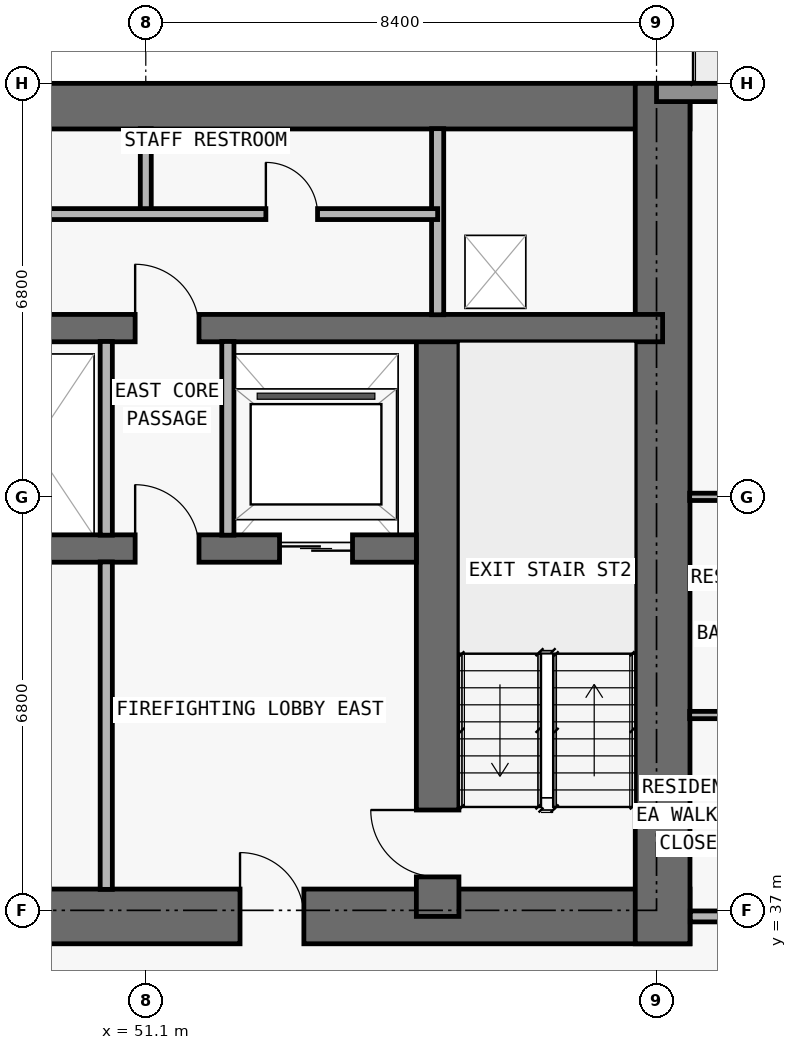
"""IFC4 building model, lengths in metres.
Left out: names, types, materials, properties, quantities, classifications, styles, units other than length and angle.
Written with IfcOpenShell. Run it as: python <this file> out.ifc"""

import sys

from ifc_helpers import new_model, si_unit, direction, frame, frame_2d, origin, place, context, subcontext, project, spatial, rectangle, extrude, element, fill, save


model = new_model("IFC4")
c1 = context("Model", 3, precision=1e-05, world=origin(), true_north=direction((0.0, 1.0)))
c2 = subcontext(c1, "Body", "Model", "MODEL_VIEW")
j1 = project(units=[si_unit("LENGTHUNIT", "METRE"), si_unit("PLANEANGLEUNIT", "RADIAN")], contexts=[c1])
p1 = place(None, origin())
s1 = spatial("IfcSite", under=j1, at=p1, CompositionType="ELEMENT")
p2 = place(p1, origin())
s2 = spatial("IfcBuilding", under=s1, at=p2, CompositionType="ELEMENT")
p3 = place(p2, frame((0.0, 0.0, 46.5)))
s3 = spatial("IfcBuildingStorey", under=s2, at=p3, CompositionType="ELEMENT", Elevation=46.5)
p4 = place(p3, frame((17.75, 36.9, 0.0), z_axis=(0.0, 0.0, 1.0), x_axis=(1.0, 0.0, 0.0)))
e1 = element("IfcWall", 1, at=p4, inside=s3, PredefinedType="SHEAR", context=c2, shape_type="SweptSolid", body=[
    extrude(rectangle(XDim=42.3, YDim=0.9, at=frame_2d((21.15, 0.0))), origin(), (0.0, 0.0, 1.0), 3.05),
])
p5 = place(p4, frame((14.55, 0.0, 0.0)))
e2 = element("IfcOpeningElement", 2, at=p5, cuts=e1, PredefinedType="OPENING", context=c2, shape_type="SweptSolid", body=[
    extrude(rectangle(XDim=1.1, YDim=2.15, at=frame_2d((0.55, 1.075))), frame((0.0, 0.46, 0.0), z_axis=(0.0, -1.0, 0.0), x_axis=(1.0, 0.0, 0.0)), (0.0, 0.0, 1.0), 0.92),
])
p6 = place(p4, frame((6.4, 0.0, 0.0)))
e3 = element("IfcOpeningElement", 3, at=p6, cuts=e1, PredefinedType="OPENING", context=c2, shape_type="SweptSolid", body=[
    extrude(rectangle(XDim=1.05, YDim=2.15, at=frame_2d((0.525, 1.075))), frame((0.0, 0.46, 0.0), z_axis=(0.0, -1.0, 0.0), x_axis=(1.0, 0.0, 0.0)), (0.0, 0.0, 1.0), 0.92),
])
p7 = place(p4, frame((34.9, 0.0, 0.0)))
e4 = element("IfcOpeningElement", 4, at=p7, cuts=e1, PredefinedType="OPENING", context=c2, shape_type="SweptSolid", body=[
    extrude(rectangle(XDim=1.05, YDim=2.15, at=frame_2d((0.525, 1.075))), frame((0.0, 0.46, 0.0), z_axis=(0.0, -1.0, 0.0), x_axis=(1.0, 0.0, 0.0)), (0.0, 0.0, 1.0), 0.92),
])
p8 = place(p4, frame((11.012, 0.0, 0.0)))
e5 = element("IfcOpeningElement", 5, at=p8, cuts=e1, PredefinedType="OPENING", context=c2, shape_type="SweptSolid", body=[
    extrude(rectangle(XDim=1.05, YDim=2.15, at=frame_2d((0.525, 1.075))), frame((0.0, 0.46, 0.0), z_axis=(0.0, -1.0, 0.0), x_axis=(1.0, 0.0, 0.0)), (0.0, 0.0, 1.0), 0.92),
])
p9 = place(p4, frame((24.25, 0.0, 0.0)))
e6 = element("IfcOpeningElement", 6, at=p9, cuts=e1, PredefinedType="OPENING", context=c2, shape_type="SweptSolid", body=[
    extrude(rectangle(XDim=1.05, YDim=2.15, at=frame_2d((0.525, 1.075))), frame((0.0, 0.46, 0.0), z_axis=(0.0, -1.0, 0.0), x_axis=(1.0, 0.0, 0.0)), (0.0, 0.0, 1.0), 0.92),
])
p10 = place(p3, frame((17.75, 50.225, 0.0), z_axis=(0.0, 0.0, 1.0), x_axis=(1.0, 0.0, 0.0)))
e7 = element("IfcWall", 7, at=p10, inside=s3, PredefinedType="SHEAR", context=c2, shape_type="SweptSolid", body=[
    extrude(rectangle(XDim=42.3, YDim=0.75, at=frame_2d((21.15, 0.0))), origin(), (0.0, 0.0, 1.0), 3.05),
])
p11 = place(p3, frame((59.6, 36.45, 0.0), z_axis=(0.0, 0.0, 1.0), x_axis=(0.0, 1.0, 0.0)))
e8 = element("IfcWall", 8, at=p11, inside=s3, PredefinedType="SHEAR", context=c2, shape_type="SweptSolid", body=[
    extrude(rectangle(XDim=14.15, YDim=0.9, at=frame_2d((7.075, 0.0))), origin(), (0.0, 0.0, 1.0), 3.05),
])
p12 = place(p3, frame((55.9, 36.9, 0.0), z_axis=(0.0, 0.0, 1.0), x_axis=(0.0, 1.0, 0.0)))
e9 = element("IfcWall", 9, at=p12, inside=s3, PredefinedType="SHEAR", context=c2, shape_type="SweptSolid", body=[
    extrude(rectangle(XDim=9.675, YDim=0.7, at=frame_2d((4.837, 0.0))), origin(), (0.0, 0.0, 1.0), 3.05),
])
p13 = place(p12, frame((0.65, 0.0, 0.0)))
e10 = element("IfcOpeningElement", 10, at=p13, cuts=e9, PredefinedType="OPENING", context=c2, shape_type="SweptSolid", body=[
    extrude(rectangle(XDim=1.1, YDim=2.15, at=frame_2d((0.55, 1.075))), frame((0.0, 0.36, 0.0), z_axis=(0.0, -1.0, 0.0), x_axis=(1.0, 0.0, 0.0)), (0.0, 0.0, 1.0), 0.72),
])
p14 = place(p3, frame((22.25, 42.95, 0.0), z_axis=(0.0, 0.0, 1.0), x_axis=(1.0, 0.0, 0.0)))
e11 = element("IfcWall", 11, at=p14, inside=s3, PredefinedType="SHEAR", context=c2, shape_type="SweptSolid", body=[
    extrude(rectangle(XDim=33.3, YDim=0.45, at=frame_2d((16.65, 0.0))), origin(), (0.0, 0.0, 1.0), 3.05),
])
p15 = place(p14, frame((1.05, 0.0, 0.0)))
e12 = element("IfcOpeningElement", 12, at=p15, cuts=e11, PredefinedType="OPENING", context=c2, shape_type="SweptSolid", body=[
    extrude(rectangle(XDim=1.2, YDim=2.2, at=frame_2d((0.6, 1.1))), frame((0.0, 0.235, 0.0), z_axis=(0.0, -1.0, 0.0), x_axis=(1.0, 0.0, 0.0)), (0.0, 0.0, 1.0), 0.47),
])
p16 = place(p14, frame((31.05, 0.0, 0.0)))
e13 = element("IfcOpeningElement", 13, at=p16, cuts=e11, PredefinedType="OPENING", context=c2, shape_type="SweptSolid", body=[
    extrude(rectangle(XDim=1.2, YDim=2.2, at=frame_2d((0.6, 1.1))), frame((0.0, 0.235, 0.0), z_axis=(0.0, -1.0, 0.0), x_axis=(1.0, 0.0, 0.0)), (0.0, 0.0, 1.0), 0.47),
])
p17 = place(p14, frame((13.5, 0.0, 0.0)))
e14 = element("IfcOpeningElement", 14, at=p17, cuts=e11, PredefinedType="OPENING", context=c2, shape_type="SweptSolid", body=[
    extrude(rectangle(XDim=1.1, YDim=2.2, at=frame_2d((0.55, 1.1))), frame((0.0, 0.235, 0.0), z_axis=(0.0, -1.0, 0.0), x_axis=(1.0, 0.0, 0.0)), (0.0, 0.0, 1.0), 0.47),
])
p18 = place(p14, frame((16.1, 0.0, 0.0)))
e15 = element("IfcOpeningElement", 15, at=p18, cuts=e11, PredefinedType="OPENING", context=c2, shape_type="SweptSolid", body=[
    extrude(rectangle(XDim=1.1, YDim=2.2, at=frame_2d((0.55, 1.1))), frame((0.0, 0.235, 0.0), z_axis=(0.0, -1.0, 0.0), x_axis=(1.0, 0.0, 0.0)), (0.0, 0.0, 1.0), 0.47),
])
p19 = place(p14, frame((18.7, 0.0, 0.0)))
e16 = element("IfcOpeningElement", 16, at=p19, cuts=e11, PredefinedType="OPENING", context=c2, shape_type="SweptSolid", body=[
    extrude(rectangle(XDim=1.1, YDim=2.2, at=frame_2d((0.55, 1.1))), frame((0.0, 0.235, 0.0), z_axis=(0.0, -1.0, 0.0), x_axis=(1.0, 0.0, 0.0)), (0.0, 0.0, 1.0), 0.47),
])
p20 = place(p14, frame((3.625, 0.0, 0.0)))
e17 = element("IfcOpeningElement", 17, at=p20, cuts=e11, PredefinedType="OPENING", context=c2, shape_type="SweptSolid", body=[
    extrude(rectangle(XDim=1.05, YDim=2.15, at=frame_2d((0.525, 1.075))), frame((0.0, 0.235, 0.0), z_axis=(0.0, -1.0, 0.0), x_axis=(1.0, 0.0, 0.0)), (0.0, 0.0, 1.0), 0.47),
])
p21 = place(p14, frame((28.675, 0.0, 0.0)))
e18 = element("IfcOpeningElement", 18, at=p21, cuts=e11, PredefinedType="OPENING", context=c2, shape_type="SweptSolid", body=[
    extrude(rectangle(XDim=1.05, YDim=2.15, at=frame_2d((0.525, 1.075))), frame((0.0, 0.235, 0.0), z_axis=(0.0, -1.0, 0.0), x_axis=(1.0, 0.0, 0.0)), (0.0, 0.0, 1.0), 0.47),
])
p22 = place(p3, frame((18.2, 46.575, 0.0), z_axis=(0.0, 0.0, 1.0), x_axis=(1.0, 0.0, 0.0)))
e19 = element("IfcWall", 19, at=p22, inside=s3, PredefinedType="SHEAR", context=c2, shape_type="SweptSolid", body=[
    extrude(rectangle(XDim=41.4, YDim=0.45, at=frame_2d((20.7, 0.0))), origin(), (0.0, 0.0, 1.0), 3.05),
])
p23 = place(p22, frame((7.675, 0.0, 0.0)))
e20 = element("IfcOpeningElement", 20, at=p23, cuts=e19, PredefinedType="OPENING", context=c2, shape_type="SweptSolid", body=[
    extrude(rectangle(XDim=1.05, YDim=2.15, at=frame_2d((0.525, 1.075))), frame((0.0, 0.235, 0.0), z_axis=(0.0, -1.0, 0.0), x_axis=(1.0, 0.0, 0.0)), (0.0, 0.0, 1.0), 0.47),
])
p24 = place(p22, frame((32.725, 0.0, 0.0)))
e21 = element("IfcOpeningElement", 21, at=p24, cuts=e19, PredefinedType="OPENING", context=c2, shape_type="SweptSolid", body=[
    extrude(rectangle(XDim=1.05, YDim=2.15, at=frame_2d((0.525, 1.075))), frame((0.0, 0.235, 0.0), z_axis=(0.0, -1.0, 0.0), x_axis=(1.0, 0.0, 0.0)), (0.0, 0.0, 1.0), 0.47),
])
p25 = place(p3, frame((59.5, 50.45, 0.0), z_axis=(0.0, 0.0, 1.0), x_axis=(1.0, 0.0, 0.0)))
e22 = element("IfcWall", 22, at=p25, inside=s3, PredefinedType="STANDARD", context=c2, shape_type="SweptSolid", body=[
    extrude(rectangle(XDim=13.2, YDim=0.3, at=frame_2d((6.6, 0.0))), origin(), (0.0, 0.0, 1.0), 3.05),
])
p26 = place(p25, frame((5.6, 0.0, 0.0)))
e23 = element("IfcOpeningElement", 23, at=p26, cuts=e22, PredefinedType="OPENING", context=c2, shape_type="SweptSolid", body=[
    extrude(rectangle(XDim=2.0, YDim=2.3, at=frame_2d((1.0, 1.15))), frame((0.0, 0.16, 0.0), z_axis=(0.0, -1.0, 0.0), x_axis=(1.0, 0.0, 0.0)), (0.0, 0.0, 1.0), 0.32),
])
p27 = place(p3, frame((50.45, 37.345, 0.0), z_axis=(0.0, 0.0, 1.0), x_axis=(0.0, 1.0, 0.0)))
e24 = element("IfcWall", 24, at=p27, inside=s3, PredefinedType="PARTITIONING", context=c2, shape_type="SweptSolid", body=[
    extrude(rectangle(XDim=5.385, YDim=0.2, at=frame_2d((2.692, 0.0))), origin(), (0.0, 0.0, 1.0), 3.05),
])
p28 = place(p3, frame((50.45, 43.17, 0.0), z_axis=(0.0, 0.0, 1.0), x_axis=(0.0, 1.0, 0.0)))
e25 = element("IfcWall", 25, at=p28, inside=s3, PredefinedType="PARTITIONING", context=c2, shape_type="SweptSolid", body=[
    extrude(rectangle(XDim=3.185, YDim=0.2, at=frame_2d((1.593, 0.0))), origin(), (0.0, 0.0, 1.0), 3.05),
])
p29 = place(p3, frame((51.1, 48.45, 0.0), z_axis=(0.0, 0.0, 1.0), x_axis=(0.0, 1.0, 0.0)))
e26 = element("IfcWall", 26, at=p29, inside=s3, PredefinedType="PARTITIONING", context=c2, shape_type="SweptSolid", body=[
    extrude(rectangle(XDim=1.405, YDim=0.18, at=frame_2d((0.703, 0.0))), origin(), (0.0, 0.0, 1.0), 3.05),
])
p30 = place(p3, frame((52.45, 43.17, 0.0), z_axis=(0.0, 0.0, 1.0), x_axis=(0.0, 1.0, 0.0)))
e27 = element("IfcWall", 27, at=p30, inside=s3, PredefinedType="PARTITIONING", context=c2, shape_type="SweptSolid", body=[
    extrude(rectangle(XDim=3.185, YDim=0.2, at=frame_2d((1.593, 0.0))), origin(), (0.0, 0.0, 1.0), 3.05),
])
p31 = place(p3, frame((55.9, 46.795, 0.0), z_axis=(0.0, 0.0, 1.0), x_axis=(0.0, 1.0, 0.0)))
e28 = element("IfcWall", 28, at=p31, inside=s3, PredefinedType="PARTITIONING", context=c2, shape_type="SweptSolid", body=[
    extrude(rectangle(XDim=3.06, YDim=0.2, at=frame_2d((1.53, 0.0))), origin(), (0.0, 0.0, 1.0), 3.05),
])
p32 = place(p3, frame((60.055, 36.9, 0.0), z_axis=(0.0, 0.0, 1.0), x_axis=(1.0, 0.0, 0.0)))
e29 = element("IfcWall", 29, at=p32, inside=s3, PredefinedType="PARTITIONING", context=c2, shape_type="SweptSolid", body=[
    extrude(rectangle(XDim=12.645, YDim=0.18, at=frame_2d((6.323, 0.0))), origin(), (0.0, 0.0, 1.0), 3.05),
])
p33 = place(p32, frame((4.52, 0.0, 0.0)))
e30 = element("IfcOpeningElement", 30, at=p33, cuts=e29, PredefinedType="OPENING", context=c2, shape_type="SweptSolid", body=[
    extrude(rectangle(XDim=1.0, YDim=2.2, at=frame_2d((0.5, 1.1))), frame((0.0, 0.1, 0.0), z_axis=(0.0, -1.0, 0.0), x_axis=(1.0, 0.0, 0.0)), (0.0, 0.0, 1.0), 0.2),
])
p34 = place(p3, frame((60.045, 40.212, 0.0), z_axis=(0.0, 0.0, 1.0), x_axis=(1.0, 0.0, 0.0)))
e31 = element("IfcWall", 31, at=p34, inside=s3, PredefinedType="PARTITIONING", context=c2, shape_type="SweptSolid", body=[
    extrude(rectangle(XDim=2.205, YDim=0.12, at=frame_2d((1.103, 0.0))), origin(), (0.0, 0.0, 1.0), 3.05),
])
p35 = place(p3, frame((60.045, 43.8, 0.0), z_axis=(0.0, 0.0, 1.0), x_axis=(1.0, 0.0, 0.0)))
e32 = element("IfcWall", 32, at=p35, inside=s3, PredefinedType="PARTITIONING", context=c2, shape_type="SweptSolid", body=[
    extrude(rectangle(XDim=15.96, YDim=0.12, at=frame_2d((7.98, 0.0))), origin(), (0.0, 0.0, 1.0), 2.339),
])
p36 = place(p35, frame((9.805, 0.0, 0.0)))
e33 = element("IfcOpeningElement", 33, at=p36, cuts=e32, PredefinedType="OPENING", context=c2, shape_type="SweptSolid", body=[
    extrude(rectangle(XDim=0.9, YDim=2.15, at=frame_2d((0.45, 1.075))), frame((0.0, 0.07, 0.0), z_axis=(0.0, -1.0, 0.0), x_axis=(1.0, 0.0, 0.0)), (0.0, 0.0, 1.0), 0.14),
])
p37 = place(p35, frame((4.58, 0.0, 0.0)))
e34 = element("IfcOpeningElement", 34, at=p37, cuts=e32, PredefinedType="OPENING", context=c2, shape_type="SweptSolid", body=[
    extrude(rectangle(XDim=0.9, YDim=2.15, at=frame_2d((0.45, 1.075))), frame((0.0, 0.07, 0.0), z_axis=(0.0, -1.0, 0.0), x_axis=(1.0, 0.0, 0.0)), (0.0, 0.0, 1.0), 0.14),
])
p38 = place(p35, frame((0.677, 0.0, 0.0)))
e35 = element("IfcOpeningElement", 35, at=p38, cuts=e32, PredefinedType="OPENING", context=c2, shape_type="SweptSolid", body=[
    extrude(rectangle(XDim=0.85, YDim=2.1, at=frame_2d((0.425, 1.05))), frame((0.0, 0.07, 0.0), z_axis=(0.0, -1.0, 0.0), x_axis=(1.0, 0.0, 0.0)), (0.0, 0.0, 1.0), 0.14),
])
p39 = place(p3, frame((31.4, 48.45, 0.0), z_axis=(0.0, 0.0, 1.0), x_axis=(1.0, 0.0, 0.0)))
e36 = element("IfcWall", 36, at=p39, inside=s3, PredefinedType="PARTITIONING", context=c2, shape_type="SweptSolid", body=[
    extrude(rectangle(XDim=24.5, YDim=0.18, at=frame_2d((12.25, 0.0))), origin(), (0.0, 0.0, 1.0), 3.05),
])
p40 = place(p39, frame((1.775, 0.0, 0.0)))
e37 = element("IfcOpeningElement", 37, at=p40, cuts=e36, PredefinedType="OPENING", context=c2, shape_type="SweptSolid", body=[
    extrude(rectangle(XDim=1.2, YDim=2.2, at=frame_2d((0.6, 1.1))), frame((0.0, 0.1, 0.0), z_axis=(0.0, -1.0, 0.0), x_axis=(1.0, 0.0, 0.0)), (0.0, 0.0, 1.0), 0.2),
])
p41 = place(p39, frame((9.35, 0.0, 0.0)))
e38 = element("IfcOpeningElement", 38, at=p41, cuts=e36, PredefinedType="OPENING", context=c2, shape_type="SweptSolid", body=[
    extrude(rectangle(XDim=1.0, YDim=2.2, at=frame_2d((0.5, 1.1))), frame((0.0, 0.1, 0.0), z_axis=(0.0, -1.0, 0.0), x_axis=(1.0, 0.0, 0.0)), (0.0, 0.0, 1.0), 0.2),
])
p42 = place(p39, frame((16.725, 0.0, 0.0)))
e39 = element("IfcOpeningElement", 39, at=p42, cuts=e36, PredefinedType="OPENING", context=c2, shape_type="SweptSolid", body=[
    extrude(rectangle(XDim=1.2, YDim=2.2, at=frame_2d((0.6, 1.1))), frame((0.0, 0.1, 0.0), z_axis=(0.0, -1.0, 0.0), x_axis=(1.0, 0.0, 0.0)), (0.0, 0.0, 1.0), 0.2),
])
p43 = place(p39, frame((21.675, 0.0, 0.0)))
e40 = element("IfcOpeningElement", 40, at=p43, cuts=e36, PredefinedType="OPENING", context=c2, shape_type="SweptSolid", body=[
    extrude(rectangle(XDim=0.85, YDim=2.1, at=frame_2d((0.425, 1.05))), frame((0.0, 0.1, 0.0), z_axis=(0.0, -1.0, 0.0), x_axis=(1.0, 0.0, 0.0)), (0.0, 0.0, 1.0), 0.2),
])
p44 = place(p16, origin())
e41 = element("IfcDoor", 41, at=p44, inside=s3, OperationType="DOUBLE_DOOR_SLIDING", PredefinedType="DOOR", context=c2, shape_type="SweptSolid", body=[
    extrude(rectangle(XDim=1.2, YDim=2.2, at=frame_2d((0.6, 1.1))), frame((0.0, 0.025, 0.0), z_axis=(0.0, -1.0, 0.0), x_axis=(1.0, 0.0, 0.0)), (0.0, 0.0, 1.0), 0.05),
])
fill(e13, e41)
p45 = place(p7, origin())
e42 = element("IfcDoor", 42, at=p45, inside=s3, OperationType="SINGLE_SWING_LEFT", PredefinedType="DOOR", context=c2, shape_type="SweptSolid", body=[
    extrude(rectangle(XDim=1.05, YDim=2.15, at=frame_2d((0.525, 1.075))), frame((0.0, 0.025, 0.0), z_axis=(0.0, -1.0, 0.0), x_axis=(1.0, 0.0, 0.0)), (0.0, 0.0, 1.0), 0.05),
])
fill(e4, e42)
p46 = place(p13, origin())
e43 = element("IfcDoor", 43, at=p46, inside=s3, OperationType="SINGLE_SWING_RIGHT", PredefinedType="DOOR", context=c2, shape_type="SweptSolid", body=[
    extrude(rectangle(XDim=1.1, YDim=2.15, at=frame_2d((0.55, 1.075))), frame((0.0, 0.025, 0.0), z_axis=(0.0, -1.0, 0.0), x_axis=(1.0, 0.0, 0.0)), (0.0, 0.0, 1.0), 0.05),
])
fill(e10, e43)
p47 = place(p21, origin())
e44 = element("IfcDoor", 44, at=p47, inside=s3, OperationType="SINGLE_SWING_LEFT", PredefinedType="DOOR", context=c2, shape_type="SweptSolid", body=[
    extrude(rectangle(XDim=1.05, YDim=2.15, at=frame_2d((0.525, 1.075))), frame((0.0, 0.025, 0.0), z_axis=(0.0, -1.0, 0.0), x_axis=(1.0, 0.0, 0.0)), (0.0, 0.0, 1.0), 0.05),
])
fill(e18, e44)
p48 = place(p24, origin())
e45 = element("IfcDoor", 45, at=p48, inside=s3, OperationType="SINGLE_SWING_LEFT", PredefinedType="DOOR", context=c2, shape_type="SweptSolid", body=[
    extrude(rectangle(XDim=1.05, YDim=2.15, at=frame_2d((0.525, 1.075))), frame((0.0, 0.025, 0.0), z_axis=(0.0, -1.0, 0.0), x_axis=(1.0, 0.0, 0.0)), (0.0, 0.0, 1.0), 0.05),
])
fill(e21, e45)
p49 = place(p43, origin())
e46 = element("IfcDoor", 46, at=p49, inside=s3, OperationType="SINGLE_SWING_LEFT", PredefinedType="DOOR", context=c2, shape_type="SweptSolid", body=[
    extrude(rectangle(XDim=0.85, YDim=2.1, at=frame_2d((0.425, 1.05))), frame((0.0, 0.025, 0.0), z_axis=(0.0, -1.0, 0.0), x_axis=(1.0, 0.0, 0.0)), (0.0, 0.0, 1.0), 0.05),
])
fill(e40, e46)
save(model, sys.argv[1])
